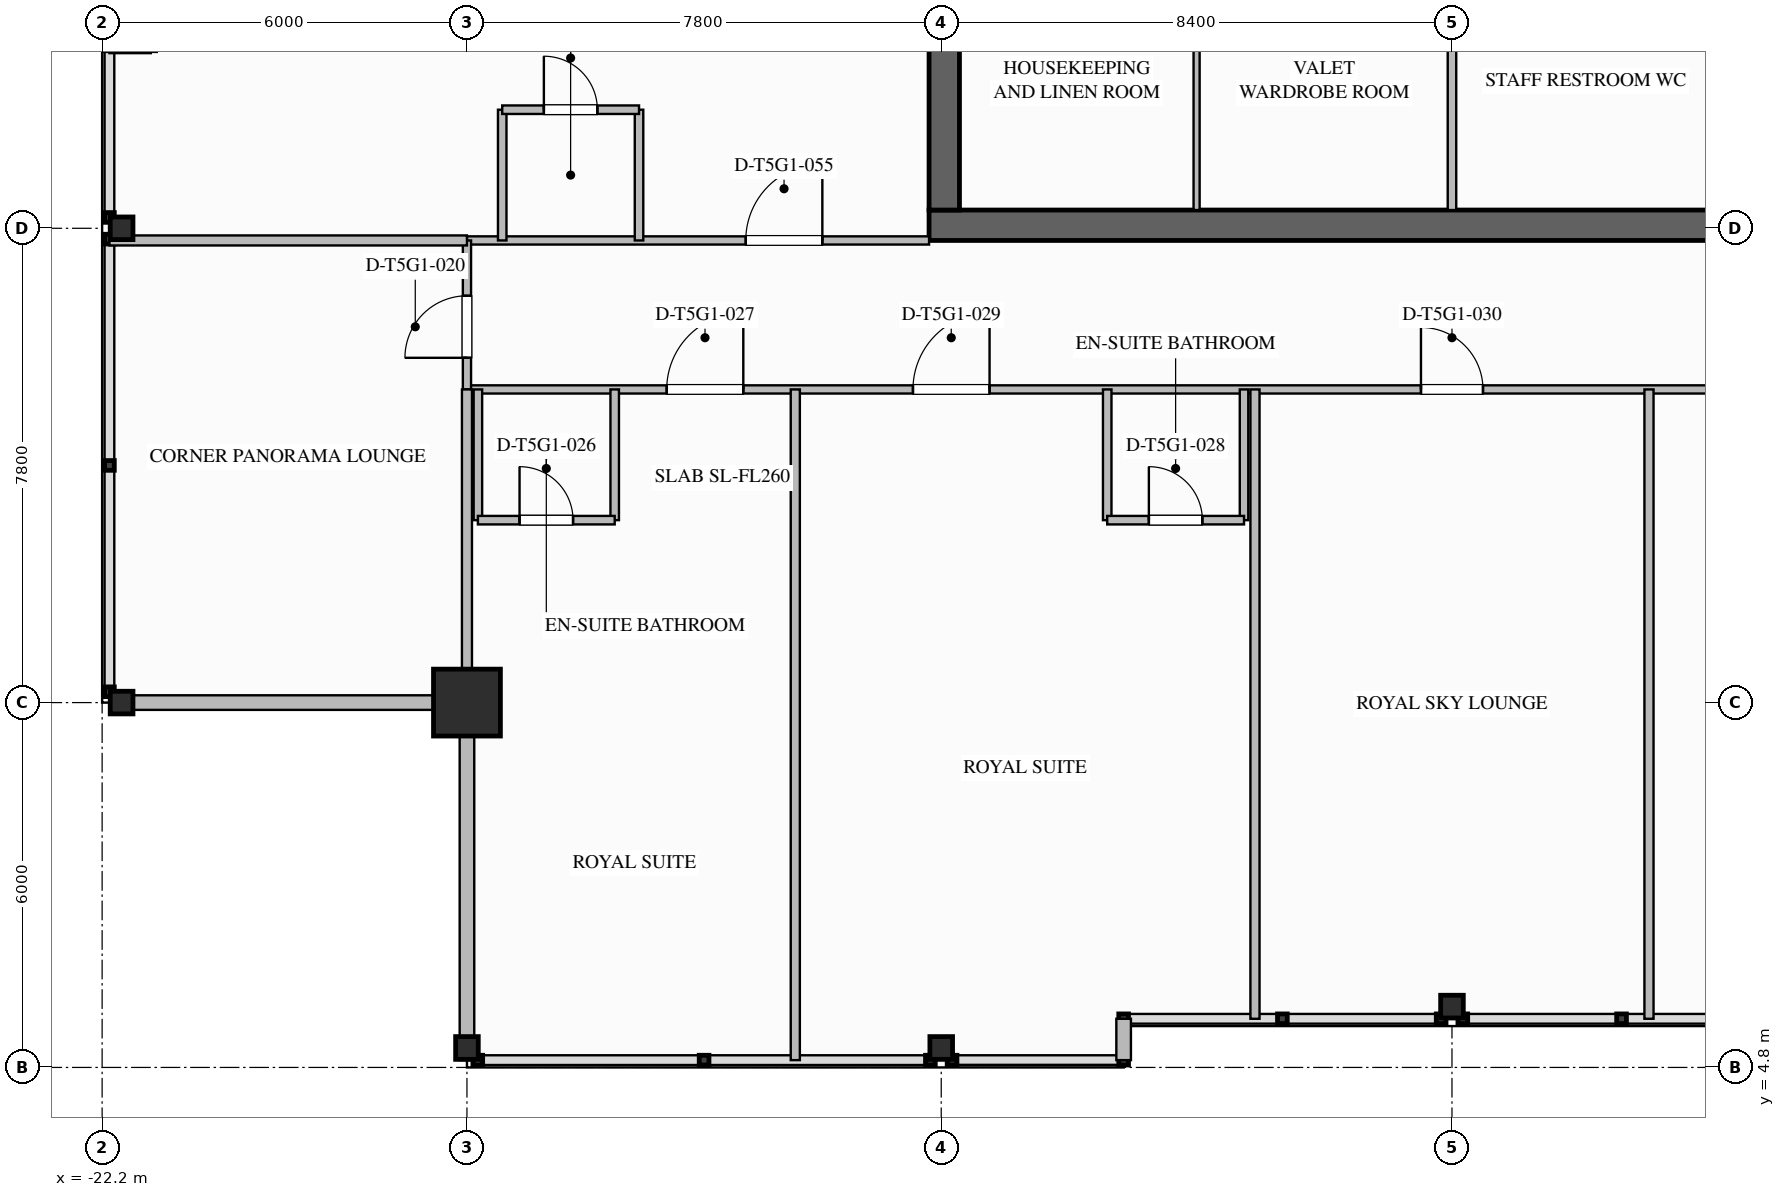
"""IFC4 building model, lengths in metres.
Left out: names, types, materials, properties, quantities, classifications, styles, units other than length and angle.
Written with IfcOpenShell. Run it as: python <this file> out.ifc"""

import sys

from ifc_helpers import new_model, si_unit, direction, frame, frame_2d, origin, origin_2d, place, context, subcontext, project, spatial, rectangle, i_section, extrude, element, fill, save


model = new_model("IFC4")
c1 = context("Model", 3, precision=1e-05, world=origin(), true_north=direction((0.0, 1.0)))
c2 = subcontext(c1, "Body", "Model", "MODEL_VIEW")
j1 = project(units=[si_unit("LENGTHUNIT", "METRE"), si_unit("PLANEANGLEUNIT", "RADIAN")], contexts=[c1])
p1 = place(None, origin())
s1 = spatial("IfcSite", under=j1, at=p1, CompositionType="ELEMENT")
p2 = place(p1, origin())
s2 = spatial("IfcBuilding", under=s1, at=p2, CompositionType="ELEMENT")
p3 = place(p2, frame((0.0, 0.0, 268.65)))
s3 = spatial("IfcBuildingStorey", under=s2, at=p3, CompositionType="ELEMENT", Elevation=268.65)
p4 = place(p3, frame((8.6, 18.65, 0.0), z_axis=(0.0, 0.0, 1.0), x_axis=(-1.0, 0.0, 0.0)))
e1 = element("IfcWall", 1, at=p4, inside=s3, PredefinedType="SHEAR", context=c2, shape_type="SweptSolid", body=[
    extrude(rectangle(XDim=17.2, YDim=0.5, at=frame_2d((8.6, 0.0))), origin(), (0.0, 0.0, 1.0), 3.65),
])
p5 = place(p3, frame((-8.35, 18.9, 0.0), z_axis=(0.0, 0.0, 1.0), x_axis=(0.0, 1.0, 0.0)))
e2 = element("IfcWall", 2, at=p5, inside=s3, PredefinedType="SHEAR", context=c2, shape_type="SweptSolid", body=[
    extrude(rectangle(XDim=16.2, YDim=0.5, at=frame_2d((8.1, 0.0))), origin(), (0.0, 0.0, 1.0), 3.65),
])
p6 = place(p3, frame((-16.2, 10.8, 0.0), z_axis=(0.0, 0.0, 1.0), x_axis=(1.0, 0.0, 0.0)))
e3 = element("IfcColumn", 3, at=p6, inside=s3, PredefinedType="COLUMN", context=c2, shape_type="SweptSolid", body=[
    extrude(rectangle(XDim=1.1, YDim=1.1, at=origin_2d()), origin(), (0.0, 0.0, 1.0), 3.65),
])
for number, where, z_axis, x_axis in (
    (4, (-21.88, 10.8, 0.0), (0.0, 0.0, 1.0), (1.0, 0.0, 0.0)),
    (5, (-21.88, 18.6, 0.0), (0.0, 0.0, 1.0), (1.0, 0.0, 0.0)),
    (6, (-16.2, 5.12, 0.0), (0.0, 0.0, 1.0), (0.0, 1.0, 0.0)),
    (7, (-8.4, 5.12, 0.0), (0.0, 0.0, 1.0), (0.0, 1.0, 0.0)),
    (8, (0.0, 5.8, 0.0), (0.0, 0.0, 1.0), (0.0, 1.0, 0.0)),
):
    element("IfcColumn", number, at=place(p3, frame(where, z_axis=z_axis, x_axis=x_axis)), inside=s3, PredefinedType="COLUMN", context=c2, shape_type="SweptSolid", body=[
        extrude(i_section(OverallWidth=0.374, OverallDepth=0.372, WebThickness=0.016, FlangeThickness=0.026, FilletRadius=0.025, at=origin_2d()), origin(), (0.0, 0.0, 1.0), 3.647),
    ])
for number, where, z_axis, x_axis in (
    (9, (-16.2, 4.92, 0.0), (0.0, 0.0, 1.0), (0.0, 1.0, 0.0)),
    (10, (-16.2, 10.8, 0.0), (0.0, 0.0, 1.0), (-1.0, 0.0, 0.0)),
):
    element("IfcWall", number, at=place(p3, frame(where, z_axis=z_axis, x_axis=x_axis)), inside=s3, PredefinedType="STANDARD", context=c2, shape_type="SweptSolid", body=[
        extrude(rectangle(XDim=5.88, YDim=0.24, at=frame_2d((2.94, 0.0))), origin(), (0.0, 0.0, 1.0), 2.779),
    ])
for number, where, z_axis, x_axis in (
    (11, (-22.08, 21.6, 0.0), (0.0, 0.0, 1.0), (1.0, 0.0, 0.0)),
    (12, (-5.4, 5.6, 0.0), (0.0, 0.0, 1.0), (0.0, -1.0, 0.0)),
):
    element("IfcWall", number, at=place(p3, frame(where, z_axis=z_axis, x_axis=x_axis)), inside=s3, PredefinedType="STANDARD", context=c2, shape_type="SweptSolid", body=[
        extrude(rectangle(XDim=0.68, YDim=0.24, at=frame_2d((0.34, 0.0))), origin(), (0.0, 0.0, 1.0), 3.39),
    ])
p7 = place(p3, frame((-4.2, 18.9, 0.0), z_axis=(0.0, 0.0, 1.0), x_axis=(0.0, 1.0, 0.0)))
e13 = element("IfcWall", 13, at=p7, inside=s3, PredefinedType="PARTITIONING", context=c2, shape_type="SweptSolid", body=[
    extrude(rectangle(XDim=4.3, YDim=0.1, at=frame_2d((2.15, 0.0))), origin(), (0.0, 0.0, 1.0), 3.39),
])
p8 = place(p3, frame((0.0, 18.9, 0.0), z_axis=(0.0, 0.0, 1.0), x_axis=(0.0, 1.0, 0.0)))
e14 = element("IfcWall", 14, at=p8, inside=s3, PredefinedType="PLUMBINGWALL", context=c2, shape_type="SweptSolid", body=[
    extrude(rectangle(XDim=4.3, YDim=0.14, at=frame_2d((2.15, 0.0))), origin(), (0.0, 0.0, 1.0), 3.39),
])
p9 = place(p3, frame((-16.2, 15.95, 0.0), z_axis=(0.0, 0.0, 1.0), x_axis=(1.0, 0.0, 0.0)))
e15 = element("IfcWall", 15, at=p9, inside=s3, PredefinedType="PARTITIONING", context=c2, shape_type="SweptSolid", body=[
    extrude(rectangle(XDim=38.28, YDim=0.135, at=frame_2d((19.14, 0.0))), origin(), (0.0, 0.0, 1.0), 3.39),
])
p10 = place(p9, frame((35.785, 0.0, 0.0)))
e16 = element("IfcOpeningElement", 16, at=p10, cuts=e15, PredefinedType="OPENING", context=c2, shape_type="SweptSolid", body=[
    extrude(rectangle(XDim=1.26, YDim=2.2, at=frame_2d((0.63, 1.1))), frame((0.0, 0.077, 0.0), z_axis=(0.0, -1.0, 0.0), x_axis=(1.0, 0.0, 0.0)), (0.0, 0.0, 1.0), 0.155),
])
p11 = place(p9, frame((3.285, 0.0, 0.0)))
e17 = element("IfcOpeningElement", 17, at=p11, cuts=e15, PredefinedType="OPENING", context=c2, shape_type="SweptSolid", body=[
    extrude(rectangle(XDim=1.26, YDim=2.2, at=frame_2d((0.63, 1.1))), frame((0.0, 0.077, 0.0), z_axis=(0.0, -1.0, 0.0), x_axis=(1.0, 0.0, 0.0)), (0.0, 0.0, 1.0), 0.155),
])
p12 = place(p9, frame((7.335, 0.0, 0.0)))
e18 = element("IfcOpeningElement", 18, at=p12, cuts=e15, PredefinedType="OPENING", context=c2, shape_type="SweptSolid", body=[
    extrude(rectangle(XDim=1.26, YDim=2.2, at=frame_2d((0.63, 1.1))), frame((0.0, 0.077, 0.0), z_axis=(0.0, -1.0, 0.0), x_axis=(1.0, 0.0, 0.0)), (0.0, 0.0, 1.0), 0.155),
])
p13 = place(p9, frame((15.69, 0.0, 0.0)))
e19 = element("IfcOpeningElement", 19, at=p13, cuts=e15, PredefinedType="OPENING", context=c2, shape_type="SweptSolid", body=[
    extrude(rectangle(XDim=1.02, YDim=2.15, at=frame_2d((0.51, 1.075))), frame((0.0, 0.077, 0.0), z_axis=(0.0, -1.0, 0.0), x_axis=(1.0, 0.0, 0.0)), (0.0, 0.0, 1.0), 0.155),
])
p14 = place(p9, frame((21.375, 0.0, 0.0)))
e20 = element("IfcOpeningElement", 20, at=p14, cuts=e15, PredefinedType="OPENING", context=c2, shape_type="SweptSolid", body=[
    extrude(rectangle(XDim=1.26, YDim=2.2, at=frame_2d((0.63, 1.1))), frame((0.0, 0.077, 0.0), z_axis=(0.0, -1.0, 0.0), x_axis=(1.0, 0.0, 0.0)), (0.0, 0.0, 1.0), 0.155),
])
p15 = place(p9, frame((30.285, 0.0, 0.0)))
e21 = element("IfcOpeningElement", 21, at=p15, cuts=e15, PredefinedType="OPENING", context=c2, shape_type="SweptSolid", body=[
    extrude(rectangle(XDim=1.26, YDim=2.2, at=frame_2d((0.63, 1.1))), frame((0.0, 0.077, 0.0), z_axis=(0.0, -1.0, 0.0), x_axis=(1.0, 0.0, 0.0)), (0.0, 0.0, 1.0), 0.155),
])
p16 = place(p3, frame((-16.2, 18.4, 0.0), z_axis=(0.0, 0.0, 1.0), x_axis=(1.0, 0.0, 0.0)))
e22 = element("IfcWall", 22, at=p16, inside=s3, PredefinedType="PARTITIONING", context=c2, shape_type="SweptSolid", body=[
    extrude(rectangle(XDim=7.6, YDim=0.135, at=frame_2d((3.8, 0.0))), origin(), (0.0, 0.0, 1.0), 2.768),
])
p17 = place(p16, frame((4.585, 0.0, 0.0)))
e23 = element("IfcOpeningElement", 23, at=p17, cuts=e22, PredefinedType="OPENING", context=c2, shape_type="SweptSolid", body=[
    extrude(rectangle(XDim=1.26, YDim=2.2, at=frame_2d((0.63, 1.1))), frame((0.0, 0.077, 0.0), z_axis=(0.0, -1.0, 0.0), x_axis=(1.0, 0.0, 0.0)), (0.0, 0.0, 1.0), 0.155),
])
p18 = place(p3, frame((-16.2, 15.95, 0.0), z_axis=(0.0, 0.0, 1.0), x_axis=(0.0, 1.0, 0.0)))
e24 = element("IfcWall", 24, at=p18, inside=s3, PredefinedType="PARTITIONING", context=c2, shape_type="SweptSolid", body=[
    extrude(rectangle(XDim=2.45, YDim=0.135, at=frame_2d((1.225, 0.0))), origin(), (0.0, 0.0, 1.0), 2.764),
])
p19 = place(p18, frame((0.52, 0.0, 0.0)))
e25 = element("IfcOpeningElement", 25, at=p19, cuts=e24, PredefinedType="OPENING", context=c2, shape_type="SweptSolid", body=[
    extrude(rectangle(XDim=1.02, YDim=2.15, at=frame_2d((0.51, 1.075))), frame((0.0, 0.077, 0.0), z_axis=(0.0, -1.0, 0.0), x_axis=(1.0, 0.0, 0.0)), (0.0, 0.0, 1.0), 0.155),
])
p20 = place(p3, frame((-16.2, 10.92, 0.0), z_axis=(0.0, 0.0, 1.0), x_axis=(0.0, 1.0, 0.0)))
e26 = element("IfcWall", 26, at=p20, inside=s3, PredefinedType="PARTITIONING", context=c2, shape_type="SweptSolid", body=[
    extrude(rectangle(XDim=5.03, YDim=0.165, at=frame_2d((2.515, 0.0))), origin(), (0.0, 0.0, 1.0), 2.764),
])
p21 = place(p3, frame((-22.08, 18.4, 0.0), z_axis=(0.0, 0.0, 1.0), x_axis=(1.0, 0.0, 0.0)))
e27 = element("IfcWall", 27, at=p21, inside=s3, PredefinedType="PARTITIONING", context=c2, shape_type="SweptSolid", body=[
    extrude(rectangle(XDim=5.88, YDim=0.165, at=frame_2d((2.94, 0.0))), origin(), (0.0, 0.0, 1.0), 2.764),
])
p22 = place(p3, frame((-16.02, 15.95, 0.0), z_axis=(0.0, 0.0, 1.0), x_axis=(0.0, -1.0, 0.0)))
e28 = element("IfcWall", 28, at=p22, inside=s3, PredefinedType="PLUMBINGWALL", context=c2, shape_type="SweptSolid", body=[
    extrude(rectangle(XDim=2.15, YDim=0.14, at=frame_2d((1.075, 0.0))), origin(), (0.0, 0.0, 1.0), 2.764),
])
p23 = place(p3, frame((-13.77, 15.95, 0.0), z_axis=(0.0, 0.0, 1.0), x_axis=(0.0, -1.0, 0.0)))
e29 = element("IfcWall", 29, at=p23, inside=s3, PredefinedType="PLUMBINGWALL", context=c2, shape_type="SweptSolid", body=[
    extrude(rectangle(XDim=2.15, YDim=0.14, at=frame_2d((1.075, 0.0))), origin(), (0.0, 0.0, 1.0), 3.39),
])
p24 = place(p3, frame((-16.02, 13.8, 0.0), z_axis=(0.0, 0.0, 1.0), x_axis=(1.0, 0.0, 0.0)))
e30 = element("IfcWall", 30, at=p24, inside=s3, PredefinedType="PLUMBINGWALL", context=c2, shape_type="SweptSolid", body=[
    extrude(rectangle(XDim=2.25, YDim=0.14, at=frame_2d((1.125, 0.0))), origin(), (0.0, 0.0, 1.0), 3.39),
])
p25 = place(p24, frame((0.685, 0.0, 0.0)))
e31 = element("IfcOpeningElement", 31, at=p25, cuts=e30, PredefinedType="OPENING", context=c2, shape_type="SweptSolid", body=[
    extrude(rectangle(XDim=0.88, YDim=2.1, at=frame_2d((0.44, 1.05))), frame((0.0, 0.08, 0.0), z_axis=(0.0, -1.0, 0.0), x_axis=(1.0, 0.0, 0.0)), (0.0, 0.0, 1.0), 0.16),
])
p26 = place(p3, frame((-10.8, 4.92, 0.0), z_axis=(0.0, 0.0, 1.0), x_axis=(0.0, 1.0, 0.0)))
e32 = element("IfcWall", 32, at=p26, inside=s3, PredefinedType="PARTITIONING", context=c2, shape_type="SweptSolid", body=[
    extrude(rectangle(XDim=11.03, YDim=0.15, at=frame_2d((5.515, 0.0))), origin(), (0.0, 0.0, 1.0), 3.39),
])
for number, where, z_axis, x_axis in (
    (33, (-5.67, 15.95, 0.0), (0.0, 0.0, 1.0), (0.0, -1.0, 0.0)),
    (34, (-3.42, 15.95, 0.0), (0.0, 0.0, 1.0), (0.0, -1.0, 0.0)),
):
    element("IfcWall", number, at=place(p3, frame(where, z_axis=z_axis, x_axis=x_axis)), inside=s3, PredefinedType="PLUMBINGWALL", context=c2, shape_type="SweptSolid", body=[
        extrude(rectangle(XDim=2.15, YDim=0.14, at=frame_2d((1.075, 0.0))), origin(), (0.0, 0.0, 1.0), 3.39),
    ])
p27 = place(p3, frame((-5.67, 13.8, 0.0), z_axis=(0.0, 0.0, 1.0), x_axis=(1.0, 0.0, 0.0)))
e35 = element("IfcWall", 35, at=p27, inside=s3, PredefinedType="PLUMBINGWALL", context=c2, shape_type="SweptSolid", body=[
    extrude(rectangle(XDim=2.25, YDim=0.14, at=frame_2d((1.125, 0.0))), origin(), (0.0, 0.0, 1.0), 3.39),
])
p28 = place(p27, frame((0.685, 0.0, 0.0)))
e36 = element("IfcOpeningElement", 36, at=p28, cuts=e35, PredefinedType="OPENING", context=c2, shape_type="SweptSolid", body=[
    extrude(rectangle(XDim=0.88, YDim=2.1, at=frame_2d((0.44, 1.05))), frame((0.0, 0.08, 0.0), z_axis=(0.0, -1.0, 0.0), x_axis=(1.0, 0.0, 0.0)), (0.0, 0.0, 1.0), 0.16),
])
for number, where, z_axis, x_axis in (
    (37, (-3.24, 5.6, 0.0), (0.0, 0.0, 1.0), (0.0, 1.0, 0.0)),
    (38, (3.24, 5.6, 0.0), (0.0, 0.0, 1.0), (0.0, 1.0, 0.0)),
):
    element("IfcWall", number, at=place(p3, frame(where, z_axis=z_axis, x_axis=x_axis)), inside=s3, PredefinedType="PARTITIONING", context=c2, shape_type="SweptSolid", body=[
        extrude(rectangle(XDim=10.35, YDim=0.15, at=frame_2d((5.175, 0.0))), origin(), (0.0, 0.0, 1.0), 3.39),
    ])
for number, where, z_axis, x_axis in (
    (39, (-15.62, 18.4, 0.0), (0.0, 0.0, 1.0), (0.0, 1.0, 0.0)),
    (40, (-13.37, 18.4, 0.0), (0.0, 0.0, 1.0), (0.0, 1.0, 0.0)),
):
    element("IfcWall", number, at=place(p3, frame(where, z_axis=z_axis, x_axis=x_axis)), inside=s3, PredefinedType="PLUMBINGWALL", context=c2, shape_type="SweptSolid", body=[
        extrude(rectangle(XDim=2.15, YDim=0.14, at=frame_2d((1.075, 0.0))), origin(), (0.0, 0.0, 1.0), 3.39),
    ])
p29 = place(p3, frame((-15.62, 20.55, 0.0), z_axis=(0.0, 0.0, 1.0), x_axis=(1.0, 0.0, 0.0)))
e41 = element("IfcWall", 41, at=p29, inside=s3, PredefinedType="PLUMBINGWALL", context=c2, shape_type="SweptSolid", body=[
    extrude(rectangle(XDim=2.25, YDim=0.14, at=frame_2d((1.125, 0.0))), origin(), (0.0, 0.0, 1.0), 3.39),
])
p30 = place(p29, frame((0.685, 0.0, 0.0)))
e42 = element("IfcOpeningElement", 42, at=p30, cuts=e41, PredefinedType="OPENING", context=c2, shape_type="SweptSolid", body=[
    extrude(rectangle(XDim=0.88, YDim=2.1, at=frame_2d((0.44, 1.05))), frame((0.0, 0.08, 0.0), z_axis=(0.0, -1.0, 0.0), x_axis=(1.0, 0.0, 0.0)), (0.0, 0.0, 1.0), 0.16),
])
p31 = place(p19, origin())
e43 = element("IfcDoor", 43, at=p31, inside=s3, OperationType="SINGLE_SWING_LEFT", PredefinedType="DOOR", context=c2, shape_type="SweptSolid", body=[
    extrude(rectangle(XDim=1.02, YDim=2.15, at=frame_2d((0.51, 1.075))), frame((0.0, 0.025, 0.0), z_axis=(0.0, -1.0, 0.0), x_axis=(1.0, 0.0, 0.0)), (0.0, 0.0, 1.0), 0.05),
])
fill(e25, e43)
p32 = place(p25, origin())
e44 = element("IfcDoor", 44, at=p32, inside=s3, OperationType="SINGLE_SWING_LEFT", PredefinedType="DOOR", context=c2, shape_type="SweptSolid", body=[
    extrude(rectangle(XDim=0.88, YDim=2.1, at=frame_2d((0.44, 1.05))), frame((0.0, 0.025, 0.0), z_axis=(0.0, -1.0, 0.0), x_axis=(1.0, 0.0, 0.0)), (0.0, 0.0, 1.0), 0.05),
])
fill(e31, e44)
p33 = place(p11, origin())
e45 = element("IfcDoor", 45, at=p33, inside=s3, OperationType="SINGLE_SWING_RIGHT", PredefinedType="DOOR", context=c2, shape_type="SweptSolid", body=[
    extrude(rectangle(XDim=1.26, YDim=2.2, at=frame_2d((0.63, 1.1))), frame((0.0, 0.025, 0.0), z_axis=(0.0, -1.0, 0.0), x_axis=(1.0, 0.0, 0.0)), (0.0, 0.0, 1.0), 0.05),
])
fill(e17, e45)
p34 = place(p28, origin())
e46 = element("IfcDoor", 46, at=p34, inside=s3, OperationType="SINGLE_SWING_LEFT", PredefinedType="DOOR", context=c2, shape_type="SweptSolid", body=[
    extrude(rectangle(XDim=0.88, YDim=2.1, at=frame_2d((0.44, 1.05))), frame((0.0, 0.025, 0.0), z_axis=(0.0, -1.0, 0.0), x_axis=(1.0, 0.0, 0.0)), (0.0, 0.0, 1.0), 0.05),
])
fill(e36, e46)
p35 = place(p12, origin())
e47 = element("IfcDoor", 47, at=p35, inside=s3, OperationType="SINGLE_SWING_RIGHT", PredefinedType="DOOR", context=c2, shape_type="SweptSolid", body=[
    extrude(rectangle(XDim=1.26, YDim=2.2, at=frame_2d((0.63, 1.1))), frame((0.0, 0.025, 0.0), z_axis=(0.0, -1.0, 0.0), x_axis=(1.0, 0.0, 0.0)), (0.0, 0.0, 1.0), 0.05),
])
fill(e18, e47)
p36 = place(p13, origin())
e48 = element("IfcDoor", 48, at=p36, inside=s3, OperationType="SINGLE_SWING_LEFT", PredefinedType="DOOR", context=c2, shape_type="SweptSolid", body=[
    extrude(rectangle(XDim=1.02, YDim=2.15, at=frame_2d((0.51, 1.075))), frame((0.0, 0.025, 0.0), z_axis=(0.0, -1.0, 0.0), x_axis=(1.0, 0.0, 0.0)), (0.0, 0.0, 1.0), 0.05),
])
fill(e19, e48)
p37 = place(p30, origin())
e49 = element("IfcDoor", 49, at=p37, inside=s3, OperationType="SINGLE_SWING_LEFT", PredefinedType="DOOR", context=c2, shape_type="SweptSolid", body=[
    extrude(rectangle(XDim=0.88, YDim=2.1, at=frame_2d((0.44, 1.05))), frame((0.0, 0.025, 0.0), z_axis=(0.0, -1.0, 0.0), x_axis=(1.0, 0.0, 0.0)), (0.0, 0.0, 1.0), 0.05),
])
fill(e42, e49)
p38 = place(p17, origin())
e50 = element("IfcDoor", 50, at=p38, inside=s3, OperationType="SINGLE_SWING_RIGHT", PredefinedType="DOOR", context=c2, shape_type="SweptSolid", body=[
    extrude(rectangle(XDim=1.26, YDim=2.2, at=frame_2d((0.63, 1.1))), frame((0.0, 0.025, 0.0), z_axis=(0.0, -1.0, 0.0), x_axis=(1.0, 0.0, 0.0)), (0.0, 0.0, 1.0), 0.05),
])
fill(e23, e50)
save(model, sys.argv[1])
